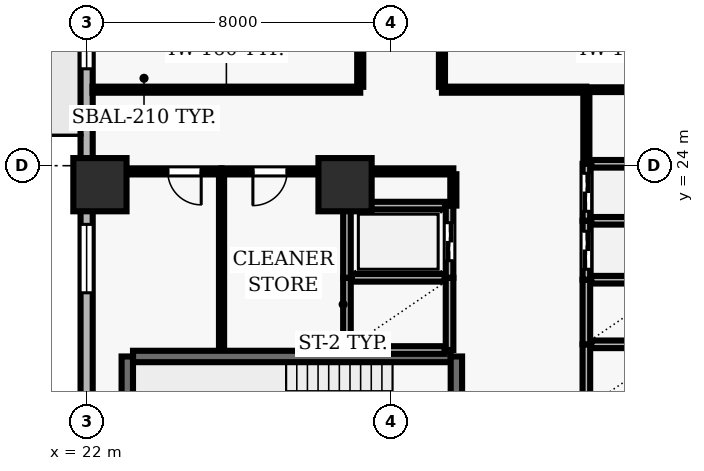
"""IFC4 building model, lengths in metres.
Left out: names, types, materials, properties, quantities, classifications, styles, units other than length and angle.
Written with IfcOpenShell. Run it as: python <this file> out.ifc"""

import sys

from ifc_helpers import new_model, si_unit, direction, frame, frame_2d, origin, origin_2d, place, context, subcontext, project, spatial, rectangle, extrude, element, fill, save


model = new_model("IFC4")
c1 = context("Model", 3, precision=1e-05, world=origin(), true_north=direction((0.0, 1.0)))
c2 = subcontext(c1, "Body", "Model", "MODEL_VIEW")
j1 = project(units=[si_unit("LENGTHUNIT", "METRE"), si_unit("PLANEANGLEUNIT", "RADIAN")], contexts=[c1])
p1 = place(None, origin())
s1 = spatial("IfcSite", under=j1, at=p1, CompositionType="ELEMENT")
p2 = place(p1, origin())
s2 = spatial("IfcBuilding", under=s1, at=p2, CompositionType="ELEMENT")
p3 = place(p2, frame((0.0, 0.0, 62.2)))
s3 = spatial("IfcBuildingStorey", under=s2, at=p3, CompositionType="ELEMENT", Elevation=62.2)
for number, where, z_axis, x_axis in (
    (1, (22.35, 23.5, 0.0), (0.0, 0.0, 1.0), (1.0, 0.0, 0.0)),
    (2, (28.8, 23.5, 0.0), (0.0, 0.0, 1.0), (1.0, 0.0, 0.0)),
):
    element("IfcColumn", number, at=place(p3, frame(where, z_axis=z_axis, x_axis=x_axis)), inside=s3, PredefinedType="COLUMN", context=c2, shape_type="SweptSolid", body=[
        extrude(rectangle(XDim=1.4, YDim=1.4, at=origin_2d()), origin(), (0.0, 0.0, 1.0), 3.9),
    ])
p4 = place(p3, frame((22.0, 51.5, 0.0), z_axis=(0.0, 0.0, 1.0), x_axis=(0.0, -1.0, 0.0)))
e3 = element("IfcWall", 3, at=p4, inside=s3, PredefinedType="SOLIDWALL", context=c2, shape_type="SweptSolid", body=[
    extrude(rectangle(XDim=49.0, YDim=0.32, at=frame_2d((24.5, 0.0))), origin(), (0.0, 0.0, 1.0), 3.69),
])
p5 = place(p4, frame((12.1, 0.0, 0.0)))
e4 = element("IfcOpeningElement", 4, at=p5, cuts=e3, PredefinedType="OPENING", context=c2, shape_type="SweptSolid", body=[
    extrude(rectangle(XDim=1.0, YDim=2.2, at=frame_2d((0.5, 1.1))), frame((0.0, 0.17, 0.0), z_axis=(0.0, -1.0, 0.0), x_axis=(1.0, 0.0, 0.0)), (0.0, 0.0, 1.0), 0.34),
])
p6 = place(p4, frame((1.822, 0.0, 0.9)))
e5 = element("IfcOpeningElement", 5, at=p6, cuts=e3, PredefinedType="OPENING", context=c2, shape_type="SweptSolid", body=[
    extrude(rectangle(XDim=1.8, YDim=1.6, at=frame_2d((0.9, 0.8))), frame((0.0, 0.17, 0.0), z_axis=(0.0, -1.0, 0.0), x_axis=(1.0, 0.0, 0.0)), (0.0, 0.0, 1.0), 0.34),
])
p7 = place(p4, frame((7.267, 0.0, 0.9)))
e6 = element("IfcOpeningElement", 6, at=p7, cuts=e3, PredefinedType="OPENING", context=c2, shape_type="SweptSolid", body=[
    extrude(rectangle(XDim=1.8, YDim=1.6, at=frame_2d((0.9, 0.8))), frame((0.0, 0.17, 0.0), z_axis=(0.0, -1.0, 0.0), x_axis=(1.0, 0.0, 0.0)), (0.0, 0.0, 1.0), 0.34),
])
p8 = place(p4, frame((18.156, 0.0, 0.9)))
e7 = element("IfcOpeningElement", 7, at=p8, cuts=e3, PredefinedType="OPENING", context=c2, shape_type="SweptSolid", body=[
    extrude(rectangle(XDim=1.8, YDim=1.6, at=frame_2d((0.9, 0.8))), frame((0.0, 0.17, 0.0), z_axis=(0.0, -1.0, 0.0), x_axis=(1.0, 0.0, 0.0)), (0.0, 0.0, 1.0), 0.34),
])
p9 = place(p4, frame((23.15, 0.0, 0.9)))
e8 = element("IfcOpeningElement", 8, at=p9, cuts=e3, PredefinedType="OPENING", context=c2, shape_type="SweptSolid", body=[
    extrude(rectangle(XDim=1.8, YDim=1.6, at=frame_2d((0.9, 0.8))), frame((0.0, 0.17, 0.0), z_axis=(0.0, -1.0, 0.0), x_axis=(1.0, 0.0, 0.0)), (0.0, 0.0, 1.0), 0.34),
])
p10 = place(p4, frame((29.044, 0.0, 0.9)))
e9 = element("IfcOpeningElement", 9, at=p10, cuts=e3, PredefinedType="OPENING", context=c2, shape_type="SweptSolid", body=[
    extrude(rectangle(XDim=1.8, YDim=1.6, at=frame_2d((0.9, 0.8))), frame((0.0, 0.17, 0.0), z_axis=(0.0, -1.0, 0.0), x_axis=(1.0, 0.0, 0.0)), (0.0, 0.0, 1.0), 0.34),
])
p11 = place(p4, frame((34.039, 0.0, 0.9)))
e10 = element("IfcOpeningElement", 10, at=p11, cuts=e3, PredefinedType="OPENING", context=c2, shape_type="SweptSolid", body=[
    extrude(rectangle(XDim=1.8, YDim=1.6, at=frame_2d((0.9, 0.8))), frame((0.0, 0.17, 0.0), z_axis=(0.0, -1.0, 0.0), x_axis=(1.0, 0.0, 0.0)), (0.0, 0.0, 1.0), 0.34),
])
p12 = place(p4, frame((39.933, 0.0, 0.9)))
e11 = element("IfcOpeningElement", 11, at=p12, cuts=e3, PredefinedType="OPENING", context=c2, shape_type="SweptSolid", body=[
    extrude(rectangle(XDim=1.8, YDim=1.6, at=frame_2d((0.9, 0.8))), frame((0.0, 0.17, 0.0), z_axis=(0.0, -1.0, 0.0), x_axis=(1.0, 0.0, 0.0)), (0.0, 0.0, 1.0), 0.34),
])
p13 = place(p3, frame((31.58, 18.98, 0.0), z_axis=(0.0, 0.0, 1.0), x_axis=(-1.0, 0.0, 0.0)))
e12 = element("IfcWall", 12, at=p13, inside=s3, PredefinedType="SHEAR", context=c2, shape_type="SweptSolid", body=[
    extrude(rectangle(XDim=8.36, YDim=0.3, at=frame_2d((4.18, 0.0))), origin(), (0.0, 0.0, 1.0), 3.69),
])
p14 = place(p3, frame((23.07, 18.98, 0.0), z_axis=(0.0, 0.0, 1.0), x_axis=(0.0, -1.0, 0.0)))
e13 = element("IfcWall", 13, at=p14, inside=s3, PredefinedType="SHEAR", context=c2, shape_type="SweptSolid", body=[
    extrude(rectangle(XDim=3.51, YDim=0.3, at=frame_2d((1.755, 0.0))), origin(), (0.0, 0.0, 1.0), 3.69),
])
p15 = place(p3, frame((31.73, 15.47, 0.0), z_axis=(0.0, 0.0, 1.0), x_axis=(0.0, 1.0, 0.0)))
e14 = element("IfcWall", 14, at=p15, inside=s3, PredefinedType="SHEAR", context=c2, shape_type="SweptSolid", body=[
    extrude(rectangle(XDim=3.51, YDim=0.3, at=frame_2d((1.755, 0.0))), origin(), (0.0, 0.0, 1.0), 3.69),
])
p16 = place(p15, frame((1.18, 0.0, 0.0)))
e15 = element("IfcOpeningElement", 15, at=p16, cuts=e14, PredefinedType="OPENING", context=c2, shape_type="SweptSolid", body=[
    extrude(rectangle(XDim=1.15, YDim=2.15, at=frame_2d((0.575, 1.075))), frame((0.0, 0.16, 0.0), z_axis=(0.0, -1.0, 0.0), x_axis=(1.0, 0.0, 0.0)), (0.0, 0.0, 1.0), 0.32),
])
p17 = place(p3, frame((35.15, 19.3, 0.0), z_axis=(0.0, 0.0, 1.0), x_axis=(0.0, -1.0, 0.0)))
e16 = element("IfcWall", 16, at=p17, inside=s3, PredefinedType="SOLIDWALL", context=c2, shape_type="SweptSolid", body=[
    extrude(rectangle(XDim=1.7, YDim=0.2, at=frame_2d((0.85, 0.0))), origin(), (0.0, 0.0, 1.0), 3.69),
])
p18 = place(p3, frame((37.42, 19.3, 0.0), z_axis=(0.0, 0.0, 1.0), x_axis=(-1.0, 0.0, 0.0)))
e17 = element("IfcWall", 17, at=p18, inside=s3, PredefinedType="SOLIDWALL", context=c2, shape_type="SweptSolid", body=[
    extrude(rectangle(XDim=2.14, YDim=0.2, at=frame_2d((1.07, 0.0))), origin(), (0.0, 0.0, 1.0), 3.69),
])
p19 = place(p3, frame((35.15, 21.0, 0.0), z_axis=(0.0, 0.0, 1.0), x_axis=(0.0, -1.0, 0.0)))
e18 = element("IfcWall", 18, at=p19, inside=s3, PredefinedType="SOLIDWALL", context=c2, shape_type="SweptSolid", body=[
    extrude(rectangle(XDim=1.7, YDim=0.2, at=frame_2d((0.85, 0.0))), origin(), (0.0, 0.0, 1.0), 3.69),
])
p20 = place(p3, frame((37.42, 21.0, 0.0), z_axis=(0.0, 0.0, 1.0), x_axis=(-1.0, 0.0, 0.0)))
e19 = element("IfcWall", 19, at=p20, inside=s3, PredefinedType="SOLIDWALL", context=c2, shape_type="SweptSolid", body=[
    extrude(rectangle(XDim=2.14, YDim=0.2, at=frame_2d((1.07, 0.0))), origin(), (0.0, 0.0, 1.0), 3.69),
])
for number, where, z_axis, x_axis in (
    (20, (28.85, 21.05, 0.0), (0.0, 0.0, 1.0), (0.0, -1.0, 0.0)),
    (21, (31.55, 19.15, 0.0), (0.0, 0.0, 1.0), (0.0, 1.0, 0.0)),
):
    element("IfcWall", number, at=place(p3, frame(where, z_axis=z_axis, x_axis=x_axis)), inside=s3, PredefinedType="SOLIDWALL", context=c2, shape_type="SweptSolid", body=[
        extrude(rectangle(XDim=1.9, YDim=0.2, at=frame_2d((0.95, 0.0))), origin(), (0.0, 0.0, 1.0), 3.69),
    ])
for number, where, z_axis, x_axis in (
    (22, (28.98, 19.15, 0.0), (0.0, 0.0, 1.0), (1.0, 0.0, 0.0)),
    (23, (31.42, 21.05, 0.0), (0.0, 0.0, 1.0), (-1.0, 0.0, 0.0)),
):
    element("IfcWall", number, at=place(p3, frame(where, z_axis=z_axis, x_axis=x_axis)), inside=s3, PredefinedType="SOLIDWALL", context=c2, shape_type="SweptSolid", body=[
        extrude(rectangle(XDim=2.44, YDim=0.2, at=frame_2d((1.22, 0.0))), origin(), (0.0, 0.0, 1.0), 3.69),
    ])
p21 = place(p3, frame((35.15, 22.55, 0.0), z_axis=(0.0, 0.0, 1.0), x_axis=(0.0, -1.0, 0.0)))
e24 = element("IfcWall", 24, at=p21, inside=s3, PredefinedType="SOLIDWALL", context=c2, shape_type="SweptSolid", body=[
    extrude(rectangle(XDim=1.55, YDim=0.2, at=frame_2d((0.775, 0.0))), origin(), (0.0, 0.0, 1.0), 3.69),
])
p22 = place(p21, frame((0.275, 0.0, 0.0)))
e25 = element("IfcOpeningElement", 25, at=p22, cuts=e24, PredefinedType="OPENING", context=c2, shape_type="SweptSolid", body=[
    extrude(rectangle(XDim=1.0, YDim=2.1, at=frame_2d((0.5, 1.05))), frame((0.0, 0.11, 0.0), z_axis=(0.0, -1.0, 0.0), x_axis=(1.0, 0.0, 0.0)), (0.0, 0.0, 1.0), 0.22),
])
p23 = place(p3, frame((37.42, 22.55, 0.0), z_axis=(0.0, 0.0, 1.0), x_axis=(-1.0, 0.0, 0.0)))
e26 = element("IfcWall", 26, at=p23, inside=s3, PredefinedType="SOLIDWALL", context=c2, shape_type="SweptSolid", body=[
    extrude(rectangle(XDim=2.14, YDim=0.2, at=frame_2d((1.07, 0.0))), origin(), (0.0, 0.0, 1.0), 3.69),
])
p24 = place(p3, frame((35.15, 24.05, 0.0), z_axis=(0.0, 0.0, 1.0), x_axis=(0.0, -1.0, 0.0)))
e27 = element("IfcWall", 27, at=p24, inside=s3, PredefinedType="SOLIDWALL", context=c2, shape_type="SweptSolid", body=[
    extrude(rectangle(XDim=1.5, YDim=0.2, at=frame_2d((0.75, 0.0))), origin(), (0.0, 0.0, 1.0), 3.69),
])
p25 = place(p24, frame((0.25, 0.0, 0.0)))
e28 = element("IfcOpeningElement", 28, at=p25, cuts=e27, PredefinedType="OPENING", context=c2, shape_type="SweptSolid", body=[
    extrude(rectangle(XDim=1.0, YDim=2.1, at=frame_2d((0.5, 1.05))), frame((0.0, 0.11, 0.0), z_axis=(0.0, -1.0, 0.0), x_axis=(1.0, 0.0, 0.0)), (0.0, 0.0, 1.0), 0.22),
])
p26 = place(p3, frame((37.42, 24.05, 0.0), z_axis=(0.0, 0.0, 1.0), x_axis=(-1.0, 0.0, 0.0)))
e29 = element("IfcWall", 29, at=p26, inside=s3, PredefinedType="SOLIDWALL", context=c2, shape_type="SweptSolid", body=[
    extrude(rectangle(XDim=2.14, YDim=0.2, at=frame_2d((1.07, 0.0))), origin(), (0.0, 0.0, 1.0), 3.69),
])
p27 = place(p3, frame((28.85, 22.95, 0.0), z_axis=(0.0, 0.0, 1.0), x_axis=(0.0, -1.0, 0.0)))
e30 = element("IfcWall", 30, at=p27, inside=s3, PredefinedType="SOLIDWALL", context=c2, shape_type="SweptSolid", body=[
    extrude(rectangle(XDim=1.9, YDim=0.2, at=frame_2d((0.95, 0.0))), origin(), (0.0, 0.0, 1.0), 3.69),
])
p28 = place(p3, frame((31.55, 21.05, 0.0), z_axis=(0.0, 0.0, 1.0), x_axis=(0.0, 1.0, 0.0)))
e31 = element("IfcWall", 31, at=p28, inside=s3, PredefinedType="SOLIDWALL", context=c2, shape_type="SweptSolid", body=[
    extrude(rectangle(XDim=1.9, YDim=0.2, at=frame_2d((0.95, 0.0))), origin(), (0.0, 0.0, 1.0), 3.69),
])
p29 = place(p28, frame((0.45, 0.0, 0.0)))
e32 = element("IfcOpeningElement", 32, at=p29, cuts=e31, PredefinedType="OPENING", context=c2, shape_type="SweptSolid", body=[
    extrude(rectangle(XDim=1.0, YDim=2.1, at=frame_2d((0.5, 1.05))), frame((0.0, 0.11, 0.0), z_axis=(0.0, -1.0, 0.0), x_axis=(1.0, 0.0, 0.0)), (0.0, 0.0, 1.0), 0.22),
])
p30 = place(p3, frame((31.43, 22.95, 0.0), z_axis=(0.0, 0.0, 1.0), x_axis=(-1.0, 0.0, 0.0)))
e33 = element("IfcWall", 33, at=p30, inside=s3, PredefinedType="SOLIDWALL", context=c2, shape_type="SweptSolid", body=[
    extrude(rectangle(XDim=2.46, YDim=0.2, at=frame_2d((1.23, 0.0))), origin(), (0.0, 0.0, 1.0), 3.69),
])
p31 = place(p3, frame((25.55, 23.85, 0.0), z_axis=(0.0, 0.0, 1.0), x_axis=(-1.0, 0.0, 0.0)))
e34 = element("IfcWall", 34, at=p31, inside=s3, PredefinedType="PARTITIONING", context=c2, shape_type="SweptSolid", body=[
    extrude(rectangle(XDim=3.35, YDim=0.16, at=frame_2d((1.675, 0.0))), origin(), (0.0, 0.0, 1.0), 2.995),
])
p32 = place(p31, frame((0.535, 0.0, 0.0)))
e35 = element("IfcOpeningElement", 35, at=p32, cuts=e34, PredefinedType="OPENING", context=c2, shape_type="SweptSolid", body=[
    extrude(rectangle(XDim=0.88, YDim=2.1, at=frame_2d((0.44, 1.05))), frame((0.0, 0.09, 0.0), z_axis=(0.0, -1.0, 0.0), x_axis=(1.0, 0.0, 0.0)), (0.0, 0.0, 1.0), 0.18),
])
p33 = place(p3, frame((28.8, 23.85, 0.0), z_axis=(0.0, 0.0, 1.0), x_axis=(-1.0, 0.0, 0.0)))
e36 = element("IfcWall", 36, at=p33, inside=s3, PredefinedType="PARTITIONING", context=c2, shape_type="SweptSolid", body=[
    extrude(rectangle(XDim=3.25, YDim=0.16, at=frame_2d((1.625, 0.0))), origin(), (0.0, 0.0, 1.0), 2.995),
])
p34 = place(p33, frame((1.525, 0.0, 0.0)))
e37 = element("IfcOpeningElement", 37, at=p34, cuts=e36, PredefinedType="OPENING", context=c2, shape_type="SweptSolid", body=[
    extrude(rectangle(XDim=0.9, YDim=2.1, at=frame_2d((0.45, 1.05))), frame((0.0, 0.09, 0.0), z_axis=(0.0, -1.0, 0.0), x_axis=(1.0, 0.0, 0.0)), (0.0, 0.0, 1.0), 0.18),
])
p35 = place(p3, frame((28.8, 23.85, 0.0), z_axis=(0.0, 0.0, 1.0), x_axis=(1.0, 0.0, 0.0)))
e38 = element("IfcWall", 38, at=p35, inside=s3, PredefinedType="PARTITIONING", context=c2, shape_type="SweptSolid", body=[
    extrude(rectangle(XDim=2.85, YDim=0.16, at=frame_2d((1.425, 0.0))), origin(), (0.0, 0.0, 1.0), 3.69),
])
p36 = place(p3, frame((29.2, 26.0, 0.0), z_axis=(0.0, 0.0, 1.0), x_axis=(-1.0, 0.0, 0.0)))
e39 = element("IfcWall", 39, at=p36, inside=s3, PredefinedType="PARTITIONING", context=c2, shape_type="SweptSolid", body=[
    extrude(rectangle(XDim=7.045, YDim=0.16, at=frame_2d((3.522, 0.0))), origin(), (0.0, 0.0, 1.0), 3.69),
])
p37 = place(p3, frame((35.15, 26.0, 0.0), z_axis=(0.0, 0.0, 1.0), x_axis=(-1.0, 0.0, 0.0)))
e40 = element("IfcWall", 40, at=p37, inside=s3, PredefinedType="PARTITIONING", context=c2, shape_type="SweptSolid", body=[
    extrude(rectangle(XDim=3.8, YDim=0.16, at=frame_2d((1.9, 0.0))), origin(), (0.0, 0.0, 1.0), 3.69),
])
p38 = place(p3, frame((35.15, 26.0, 0.0), z_axis=(0.0, 0.0, 1.0), x_axis=(1.0, 0.0, 0.0)))
e41 = element("IfcWall", 41, at=p38, inside=s3, PredefinedType="PARTITIONING", context=c2, shape_type="SweptSolid", body=[
    extrude(rectangle(XDim=2.7, YDim=0.125, at=frame_2d((1.35, 0.0))), origin(), (0.0, 0.0, 1.0), 3.69),
])
p39 = place(p3, frame((25.55, 19.16, 0.0), z_axis=(0.0, 0.0, 1.0), x_axis=(0.0, 1.0, 0.0)))
e42 = element("IfcWall", 42, at=p39, inside=s3, PredefinedType="PARTITIONING", context=c2, shape_type="SweptSolid", body=[
    extrude(rectangle(XDim=4.615, YDim=0.135, at=frame_2d((2.308, 0.0))), origin(), (0.0, 0.0, 1.0), 3.69),
])
p40 = place(p3, frame((28.8, 22.95, 0.0), z_axis=(0.0, 0.0, 1.0), x_axis=(0.0, 1.0, 0.0)))
e43 = element("IfcWall", 43, at=p40, inside=s3, PredefinedType="PARTITIONING", context=c2, shape_type="SweptSolid", body=[
    extrude(rectangle(XDim=0.825, YDim=0.125, at=frame_2d((0.413, 0.0))), origin(), (0.0, 0.0, 1.0), 3.69),
])
p41 = place(p3, frame((29.2, 41.115, 0.0), z_axis=(0.0, 0.0, 1.0), x_axis=(0.0, -1.0, 0.0)))
e44 = element("IfcWall", 44, at=p41, inside=s3, PredefinedType="PARTITIONING", context=c2, shape_type="SweptSolid", body=[
    extrude(rectangle(XDim=15.04, YDim=0.16, at=frame_2d((7.52, 0.0))), origin(), (0.0, 0.0, 1.0), 3.69),
])
p42 = place(p41, frame((7.07, 0.0, 0.0)))
e45 = element("IfcOpeningElement", 45, at=p42, cuts=e44, PredefinedType="OPENING", context=c2, shape_type="SweptSolid", body=[
    extrude(rectangle(XDim=0.9, YDim=2.1, at=frame_2d((0.45, 1.05))), frame((0.0, 0.09, 0.0), z_axis=(0.0, -1.0, 0.0), x_axis=(1.0, 0.0, 0.0)), (0.0, 0.0, 1.0), 0.18),
])
p43 = place(p3, frame((31.35, 26.075, 0.0), z_axis=(0.0, 0.0, 1.0), x_axis=(0.0, 1.0, 0.0)))
e46 = element("IfcWall", 46, at=p43, inside=s3, PredefinedType="PARTITIONING", context=c2, shape_type="SweptSolid", body=[
    extrude(rectangle(XDim=15.058, YDim=0.16, at=frame_2d((7.529, 0.0))), origin(), (0.0, 0.0, 1.0), 3.69),
])
p44 = place(p43, frame((7.029, 0.0, 0.0)))
e47 = element("IfcOpeningElement", 47, at=p44, cuts=e46, PredefinedType="OPENING", context=c2, shape_type="SweptSolid", body=[
    extrude(rectangle(XDim=1.0, YDim=2.1, at=frame_2d((0.5, 1.05))), frame((0.0, 0.09, 0.0), z_axis=(0.0, -1.0, 0.0), x_axis=(1.0, 0.0, 0.0)), (0.0, 0.0, 1.0), 0.18),
])
p45 = place(p3, frame((31.65, 23.775, 0.0), z_axis=(0.0, 0.0, 1.0), x_axis=(0.0, -1.0, 0.0)))
e48 = element("IfcWall", 48, at=p45, inside=s3, PredefinedType="PARTITIONING", context=c2, shape_type="SweptSolid", body=[
    extrude(rectangle(XDim=0.825, YDim=0.16, at=frame_2d((0.413, 0.0))), origin(), (0.0, 0.0, 1.0), 3.69),
])
p46 = place(p3, frame((35.15, 24.07, 0.0), z_axis=(0.0, 0.0, 1.0), x_axis=(0.0, 1.0, 0.0)))
e49 = element("IfcWall", 49, at=p46, inside=s3, PredefinedType="PARTITIONING", context=c2, shape_type="SweptSolid", body=[
    extrude(rectangle(XDim=1.855, YDim=0.16, at=frame_2d((0.927, 0.0))), origin(), (0.0, 0.0, 1.0), 3.69),
])
p47 = place(p9, origin())
e50 = element("IfcWindow", 50, at=p47, inside=s3, PartitioningType="SINGLE_PANEL", PredefinedType="WINDOW", context=c2, shape_type="SweptSolid", body=[
    extrude(rectangle(XDim=1.8, YDim=1.6, at=frame_2d((0.9, 0.8))), frame((0.0, 0.03, 0.0), z_axis=(0.0, -1.0, 0.0), x_axis=(1.0, 0.0, 0.0)), (0.0, 0.0, 1.0), 0.06),
])
fill(e8, e50)
p48 = place(p10, origin())
e51 = element("IfcWindow", 51, at=p48, inside=s3, PartitioningType="SINGLE_PANEL", PredefinedType="WINDOW", context=c2, shape_type="SweptSolid", body=[
    extrude(rectangle(XDim=1.8, YDim=1.6, at=frame_2d((0.9, 0.8))), frame((0.0, 0.03, 0.0), z_axis=(0.0, -1.0, 0.0), x_axis=(1.0, 0.0, 0.0)), (0.0, 0.0, 1.0), 0.06),
])
fill(e9, e51)
p49 = place(p22, origin())
e52 = element("IfcDoor", 52, at=p49, inside=s3, OperationType="DOUBLE_DOOR_SLIDING", PredefinedType="DOOR", context=c2, shape_type="SweptSolid", body=[
    extrude(rectangle(XDim=1.0, YDim=2.1, at=frame_2d((0.5, 1.05))), frame((0.0, 0.025, 0.0), z_axis=(0.0, -1.0, 0.0), x_axis=(1.0, 0.0, 0.0)), (0.0, 0.0, 1.0), 0.05),
])
fill(e25, e52)
p50 = place(p25, origin())
e53 = element("IfcDoor", 53, at=p50, inside=s3, OperationType="DOUBLE_DOOR_SLIDING", PredefinedType="DOOR", context=c2, shape_type="SweptSolid", body=[
    extrude(rectangle(XDim=1.0, YDim=2.1, at=frame_2d((0.5, 1.05))), frame((0.0, 0.025, 0.0), z_axis=(0.0, -1.0, 0.0), x_axis=(1.0, 0.0, 0.0)), (0.0, 0.0, 1.0), 0.05),
])
fill(e28, e53)
p51 = place(p29, origin())
e54 = element("IfcDoor", 54, at=p51, inside=s3, OperationType="DOUBLE_DOOR_SLIDING", PredefinedType="DOOR", context=c2, shape_type="SweptSolid", body=[
    extrude(rectangle(XDim=1.0, YDim=2.1, at=frame_2d((0.5, 1.05))), frame((0.0, 0.025, 0.0), z_axis=(0.0, -1.0, 0.0), x_axis=(1.0, 0.0, 0.0)), (0.0, 0.0, 1.0), 0.05),
])
fill(e32, e54)
p52 = place(p32, origin())
e55 = element("IfcDoor", 55, at=p52, inside=s3, OperationType="SINGLE_SWING_LEFT", PredefinedType="DOOR", context=c2, shape_type="SweptSolid", body=[
    extrude(rectangle(XDim=0.88, YDim=2.1, at=frame_2d((0.44, 1.05))), frame((0.0, 0.025, 0.0), z_axis=(0.0, -1.0, 0.0), x_axis=(1.0, 0.0, 0.0)), (0.0, 0.0, 1.0), 0.05),
])
fill(e35, e55)
p53 = place(p34, origin())
e56 = element("IfcDoor", 56, at=p53, inside=s3, OperationType="SINGLE_SWING_RIGHT", PredefinedType="DOOR", context=c2, shape_type="SweptSolid", body=[
    extrude(rectangle(XDim=0.9, YDim=2.1, at=frame_2d((0.45, 1.05))), frame((0.0, 0.025, 0.0), z_axis=(0.0, -1.0, 0.0), x_axis=(1.0, 0.0, 0.0)), (0.0, 0.0, 1.0), 0.05),
])
fill(e37, e56)
save(model, sys.argv[1])
